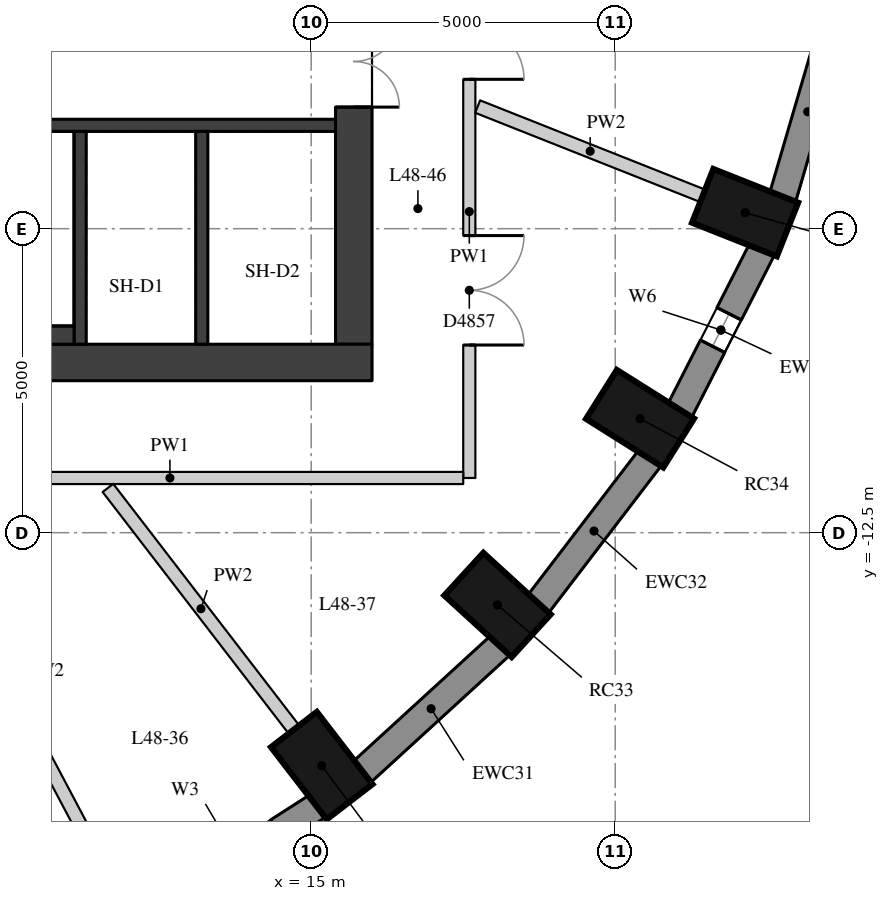
"""IFC4 building model, lengths in metres.
Left out: names, types, materials, properties, quantities, classifications, styles, units other than length and angle.
Written with IfcOpenShell. Run it as: python <this file> out.ifc"""

import sys

from ifc_helpers import new_model, si_unit, direction, frame, frame_2d, origin, origin_2d, place, context, subcontext, project, spatial, rectangle, extrude, element, fill, save


model = new_model("IFC4")
c1 = context("Model", 3, precision=1e-05, world=origin(), true_north=direction((0.0, 1.0)))
c2 = subcontext(c1, "Body", "Model", "MODEL_VIEW")
j1 = project(units=[si_unit("LENGTHUNIT", "METRE"), si_unit("PLANEANGLEUNIT", "RADIAN")], contexts=[c1])
p1 = place(None, origin())
s1 = spatial("IfcSite", under=j1, at=p1, CompositionType="ELEMENT")
p2 = place(p1, origin())
s2 = spatial("IfcBuilding", under=s1, at=p2, CompositionType="ELEMENT")
p3 = place(p2, frame((0.0, 0.0, 171.5)))
s3 = spatial("IfcBuildingStorey", under=s2, at=p3, CompositionType="ELEMENT", Elevation=171.5)
for number, where, z_axis, x_axis in (
    (1, (15.173, -16.332, 0.0), (0.0, 0.0, 1.0), (0.61, -0.792, 0.0)),
    (2, (18.064, -13.688, 0.0), (0.0, 0.0, 1.0), (0.738, -0.675, 0.0)),
    (3, (20.408, -10.625, 0.0), (0.0, 0.0, 1.0), (0.846, -0.533, 0.0)),
    (4, (22.136, -7.236, 0.0), (0.0, 0.0, 1.0), (0.93, -0.369, 0.0)),
):
    element("IfcColumn", number, at=place(p3, frame(where, z_axis=z_axis, x_axis=x_axis)), inside=s3, PredefinedType="COLUMN", context=c2, shape_type="SweptSolid", body=[
        extrude(rectangle(XDim=1.5, YDim=0.95, at=origin_2d()), origin(), (0.0, 0.0, 1.0), 3.3),
    ])
p4 = place(p3, frame((12.455, -18.693, 0.0), z_axis=(0.0, 0.0, 1.0), x_axis=(0.842065914439, 0.539374633943, 0.0)))
e5 = element("IfcWall", 5, at=p4, inside=s3, PredefinedType="SOLIDWALL", context=c2, shape_type="SweptSolid", body=[
    extrude(rectangle(XDim=3.151, YDim=0.45, at=frame_2d((1.576, 0.0))), origin(), (0.0, 0.0, 1.0), 3.02),
])
p5 = place(p4, frame((0.776, 0.0, 0.4)))
e6 = element("IfcOpeningElement", 6, at=p5, cuts=e5, PredefinedType="OPENING", context=c2, shape_type="SweptSolid", body=[
    extrude(rectangle(XDim=1.6, YDim=1.75, at=frame_2d((0.8, 0.875))), frame((0.0, 0.235, 0.0), z_axis=(0.0, -1.0, 0.0), x_axis=(1.0, 0.0, 0.0)), (0.0, 0.0, 1.0), 0.47),
])
p6 = place(p3, frame((15.83, -16.439, 0.0), z_axis=(0.0, 0.0, 1.0), x_axis=(0.737808755941, 0.675009807082, 0.0)))
e7 = element("IfcWall", 7, at=p6, inside=s3, PredefinedType="SOLIDWALL", context=c2, shape_type="SweptSolid", body=[
    extrude(rectangle(XDim=3.094, YDim=0.45, at=frame_2d((1.547, 0.0))), origin(), (0.0, 0.0, 1.0), 3.02),
])
p7 = place(p3, frame((18.728, -13.679, 0.0), z_axis=(0.0, 0.0, 1.0), x_axis=(0.607817056371, 0.794077090706, 0.0)))
e8 = element("IfcWall", 8, at=p7, inside=s3, PredefinedType="SOLIDWALL", context=c2, shape_type="SweptSolid", body=[
    extrude(rectangle(XDim=3.037, YDim=0.45, at=frame_2d((1.519, 0.0))), origin(), (0.0, 0.0, 1.0), 3.02),
])
p8 = place(p3, frame((21.059, -10.497, 0.0), z_axis=(0.0, 0.0, 1.0), x_axis=(0.454133999889, 0.890933392653, 0.0)))
e9 = element("IfcWall", 9, at=p8, inside=s3, PredefinedType="SOLIDWALL", context=c2, shape_type="SweptSolid", body=[
    extrude(rectangle(XDim=2.986, YDim=0.45, at=frame_2d((1.493, 0.0))), origin(), (0.0, 0.0, 1.0), 3.02),
])
p9 = place(p8, frame((1.193, 0.0, 0.4)))
e10 = element("IfcOpeningElement", 10, at=p9, cuts=e9, PredefinedType="OPENING", context=c2, shape_type="SweptSolid", body=[
    extrude(rectangle(XDim=0.6, YDim=1.75, at=frame_2d((0.3, 0.875))), frame((0.0, 0.235, 0.0), z_axis=(0.0, -1.0, 0.0), x_axis=(1.0, 0.0, 0.0)), (0.0, 0.0, 1.0), 0.47),
])
p10 = place(p3, frame((22.751, -6.991, 0.0), z_axis=(0.0, 0.0, 1.0), x_axis=(0.281049481624, 0.959693278542, 0.0)))
e11 = element("IfcWall", 11, at=p10, inside=s3, PredefinedType="SOLIDWALL", context=c2, shape_type="SweptSolid", body=[
    extrude(rectangle(XDim=2.948, YDim=0.45, at=frame_2d((1.474, 0.0))), origin(), (0.0, 0.0, 1.0), 3.02),
])
p11 = place(p3, frame((15.7, -9.4, 0.0), z_axis=(0.0, 0.0, 1.0), x_axis=(0.0, 1.0, 0.0)))
e12 = element("IfcWall", 12, at=p11, inside=s3, PredefinedType="SHEAR", context=c2, shape_type="SweptSolid", body=[
    extrude(rectangle(XDim=18.8, YDim=0.6, at=frame_2d((9.4, 0.0))), origin(), (0.0, 0.0, 1.0), 3.02),
])
p12 = place(p11, frame((13.4, 0.0, 0.0)))
e13 = element("IfcOpeningElement", 13, at=p12, cuts=e12, PredefinedType="OPENING", context=c2, shape_type="SweptSolid", body=[
    extrude(rectangle(XDim=1.5, YDim=2.1, at=frame_2d((0.75, 1.05))), frame((0.0, 0.31, 0.0), z_axis=(0.0, -1.0, 0.0), x_axis=(1.0, 0.0, 0.0)), (0.0, 0.0, 1.0), 0.62),
])
p13 = place(p11, frame((3.9, 0.0, 0.0)))
e14 = element("IfcOpeningElement", 14, at=p13, cuts=e12, PredefinedType="OPENING", context=c2, shape_type="SweptSolid", body=[
    extrude(rectangle(XDim=1.5, YDim=2.1, at=frame_2d((0.75, 1.05))), frame((0.0, 0.31, 0.0), z_axis=(0.0, -1.0, 0.0), x_axis=(1.0, 0.0, 0.0)), (0.0, 0.0, 1.0), 0.62),
])
p14 = place(p3, frame((4.0, -9.7, 0.0), z_axis=(0.0, 0.0, 1.0), x_axis=(1.0, 0.0, 0.0)))
e15 = element("IfcWall", 15, at=p14, inside=s3, PredefinedType="SHEAR", context=c2, shape_type="SweptSolid", body=[
    extrude(rectangle(XDim=12.0, YDim=0.6, at=frame_2d((6.0, 0.0))), origin(), (0.0, 0.0, 1.0), 3.02),
])
p15 = place(p3, frame((4.6, -5.8, 0.0), z_axis=(0.0, 0.0, 1.0), x_axis=(1.0, 0.0, 0.0)))
e16 = element("IfcWall", 16, at=p15, inside=s3, PredefinedType="SHEAR", context=c2, shape_type="SweptSolid", body=[
    extrude(rectangle(XDim=10.8, YDim=0.2, at=frame_2d((5.4, 0.0))), origin(), (0.0, 0.0, 1.0), 3.02),
])
for number, where, z_axis, x_axis in (
    (17, (11.2, -9.4, 0.0), (0.0, 0.0, 1.0), (0.0, 1.0, 0.0)),
    (18, (13.2, -9.4, 0.0), (0.0, 0.0, 1.0), (0.0, 1.0, 0.0)),
):
    element("IfcWall", number, at=place(p3, frame(where, z_axis=z_axis, x_axis=x_axis)), inside=s3, PredefinedType="SHEAR", context=c2, shape_type="SweptSolid", body=[
        extrude(rectangle(XDim=3.5, YDim=0.2, at=frame_2d((1.75, 0.0))), origin(), (0.0, 0.0, 1.0), 3.02),
    ])
p16 = place(p3, frame((6.22, -9.25, 0.0), z_axis=(0.0, 0.0, 1.0), x_axis=(1.0, 0.0, 0.0)))
e19 = element("IfcWall", 19, at=p16, inside=s3, PredefinedType="PARTITIONING", context=c2, shape_type="SweptSolid", body=[
    extrude(rectangle(XDim=4.88, YDim=0.3, at=frame_2d((2.44, 0.0))), origin(), (0.0, 0.0, 1.0), 3.02),
])
p17 = place(p3, frame((17.6, -2.838, 0.0), z_axis=(0.0, 0.0, 1.0), x_axis=(0.0, -1.0, 0.0)))
e20 = element("IfcWall", 20, at=p17, inside=s3, PredefinedType="PARTITIONING", context=c2, shape_type="SweptSolid", body=[
    extrude(rectangle(XDim=8.762, YDim=0.2, at=frame_2d((4.381, 0.0))), origin(), (0.0, 0.0, 1.0), 3.02),
])
p18 = place(p17, frame((4.775, 0.0, 0.0)))
e21 = element("IfcOpeningElement", 21, at=p18, cuts=e20, PredefinedType="OPENING", context=c2, shape_type="SweptSolid", body=[
    extrude(rectangle(XDim=1.8, YDim=2.1, at=frame_2d((0.9, 1.05))), frame((0.0, 0.11, 0.0), z_axis=(0.0, -1.0, 0.0), x_axis=(1.0, 0.0, 0.0)), (0.0, 0.0, 1.0), 0.22),
])
p19 = place(p17, frame((0.405, 0.0, 0.0)))
e22 = element("IfcOpeningElement", 22, at=p19, cuts=e20, PredefinedType="OPENING", context=c2, shape_type="SweptSolid", body=[
    extrude(rectangle(XDim=1.8, YDim=2.1, at=frame_2d((0.9, 1.05))), frame((0.0, 0.11, 0.0), z_axis=(0.0, -1.0, 0.0), x_axis=(1.0, 0.0, 0.0)), (0.0, 0.0, 1.0), 0.22),
])
p20 = place(p3, frame((17.5, -11.6, 0.0), z_axis=(0.0, 0.0, 1.0), x_axis=(-1.0, 0.0, 0.0)))
e23 = element("IfcWall", 23, at=p20, inside=s3, PredefinedType="PARTITIONING", context=c2, shape_type="SweptSolid", body=[
    extrude(rectangle(XDim=9.647, YDim=0.2, at=frame_2d((4.823, 0.0))), origin(), (0.0, 0.0, 1.0), 3.02),
])
p21 = place(p20, frame((7.192, 0.0, 0.0)))
e24 = element("IfcOpeningElement", 24, at=p21, cuts=e23, PredefinedType="OPENING", context=c2, shape_type="SweptSolid", body=[
    extrude(rectangle(XDim=0.9, YDim=2.1, at=frame_2d((0.45, 1.05))), frame((0.0, 0.11, 0.0), z_axis=(0.0, -1.0, 0.0), x_axis=(1.0, 0.0, 0.0)), (0.0, 0.0, 1.0), 0.22),
])
p22 = place(p3, frame((11.474, -17.813, 0.0), z_axis=(0.0, 0.0, 1.0), x_axis=(-0.468051273849, 0.88370130986, 0.0)))
e25 = element("IfcWall", 25, at=p22, inside=s3, PredefinedType="PARTITIONING", context=c2, shape_type="SweptSolid", body=[
    extrude(rectangle(XDim=6.858, YDim=0.22, at=frame_2d((3.429, 0.0))), origin(), (0.0, 0.0, 1.0), 3.02),
])
p23 = place(p3, frame((14.716, -15.737, 0.0), z_axis=(0.0, 0.0, 1.0), x_axis=(-0.609986007715, 0.792412184657, 0.0)))
e26 = element("IfcWall", 26, at=p23, inside=s3, PredefinedType="PARTITIONING", context=c2, shape_type="SweptSolid", body=[
    extrude(rectangle(XDim=5.015, YDim=0.22, at=frame_2d((2.507, 0.0))), origin(), (0.0, 0.0, 1.0), 3.02),
])
p24 = place(p3, frame((21.439, -6.96, 0.0), z_axis=(0.0, 0.0, 1.0), x_axis=(-0.929517399972, 0.368778257426, 0.0)))
e27 = element("IfcWall", 27, at=p24, inside=s3, PredefinedType="PARTITIONING", context=c2, shape_type="SweptSolid", body=[
    extrude(rectangle(XDim=3.982, YDim=0.22, at=frame_2d((1.991, 0.0))), origin(), (0.0, 0.0, 1.0), 3.02),
])
p25 = place(p9, origin())
e28 = element("IfcWindow", 28, at=p25, inside=s3, PartitioningType="SINGLE_PANEL", PredefinedType="WINDOW", context=c2, shape_type="SweptSolid", body=[
    extrude(rectangle(XDim=0.6, YDim=1.75, at=frame_2d((0.3, 0.875))), frame((0.0, 0.035, 0.0), z_axis=(0.0, -1.0, 0.0), x_axis=(1.0, 0.0, 0.0)), (0.0, 0.0, 1.0), 0.06),
])
fill(e10, e28)
p26 = place(p13, origin())
e29 = element("IfcDoor", 29, at=p26, inside=s3, OperationType="DOUBLE_DOOR_SINGLE_SWING", PredefinedType="DOOR", context=c2, shape_type="SweptSolid", body=[
    extrude(rectangle(XDim=1.5, YDim=2.1, at=frame_2d((0.75, 1.05))), frame((0.0, 0.025, 0.0), z_axis=(0.0, -1.0, 0.0), x_axis=(1.0, 0.0, 0.0)), (0.0, 0.0, 1.0), 0.05),
])
fill(e14, e29)
p27 = place(p18, origin())
e30 = element("IfcDoor", 30, at=p27, inside=s3, OperationType="DOUBLE_DOOR_SINGLE_SWING", PredefinedType="DOOR", context=c2, shape_type="SweptSolid", body=[
    extrude(rectangle(XDim=1.8, YDim=2.1, at=frame_2d((0.9, 1.05))), frame((0.0, 0.025, 0.0), z_axis=(0.0, -1.0, 0.0), x_axis=(1.0, 0.0, 0.0)), (0.0, 0.0, 1.0), 0.05),
])
fill(e21, e30)
p28 = place(p19, origin())
e31 = element("IfcDoor", 31, at=p28, inside=s3, OperationType="DOUBLE_DOOR_SINGLE_SWING", PredefinedType="DOOR", context=c2, shape_type="SweptSolid", body=[
    extrude(rectangle(XDim=1.8, YDim=2.1, at=frame_2d((0.9, 1.05))), frame((0.0, 0.025, 0.0), z_axis=(0.0, -1.0, 0.0), x_axis=(1.0, 0.0, 0.0)), (0.0, 0.0, 1.0), 0.05),
])
fill(e22, e31)
save(model, sys.argv[1])
